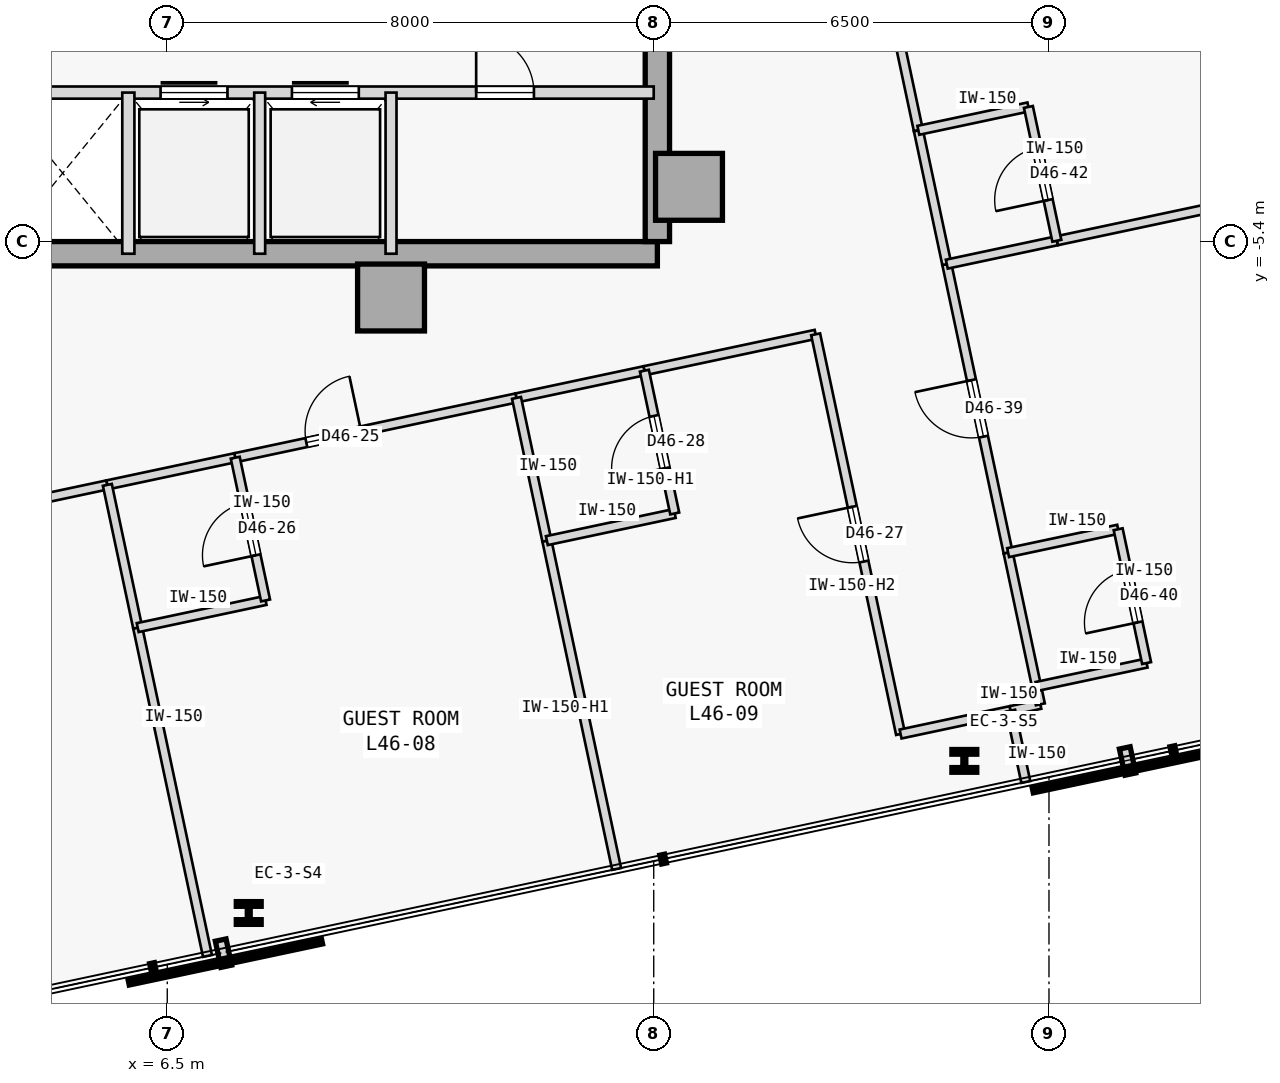
"""IFC4 building model, lengths in metres.
Left out: names, types, materials, properties, quantities, classifications, styles, units other than length and angle.
Written with IfcOpenShell. Run it as: python <this file> out.ifc"""

import sys

from ifc_helpers import new_model, si_unit, direction, frame, frame_2d, origin, origin_2d, place, context, subcontext, project, spatial, rectangle, i_section, extrude, element, fill, save


model = new_model("IFC4")
c1 = context("Model", 3, precision=1e-05, world=origin(), true_north=direction((0.0, 1.0)))
c2 = subcontext(c1, "Body", "Model", "MODEL_VIEW")
j1 = project(units=[si_unit("LENGTHUNIT", "METRE"), si_unit("PLANEANGLEUNIT", "RADIAN")], contexts=[c1])
p1 = place(None, origin())
s1 = spatial("IfcSite", under=j1, at=p1, CompositionType="ELEMENT")
p2 = place(p1, origin())
s2 = spatial("IfcBuilding", under=s1, at=p2, CompositionType="ELEMENT")
p3 = place(p2, frame((0.0, 0.0, 178.6)))
s3 = spatial("IfcBuildingStorey", under=s2, at=p3, CompositionType="ELEMENT", Elevation=178.6)
for number, where, z_axis, x_axis in (
    (1, (15.08, -4.5, 0.0), (0.0, 0.0, 1.0), (1.0, 0.0, 0.0)),
    (2, (10.18, -6.32, 0.0), (0.0, 0.0, 1.0), (1.0, 0.0, 0.0)),
):
    element("IfcColumn", number, at=place(p3, frame(where, z_axis=z_axis, x_axis=x_axis)), inside=s3, PredefinedType="COLUMN", context=c2, shape_type="SweptSolid", body=[
        extrude(rectangle(XDim=1.1, YDim=1.1, at=origin_2d()), origin(), (0.0, 0.0, 1.0), 3.4),
    ])
p4 = place(p3, frame((3.7, -5.6, 0.0), z_axis=(0.0, 0.0, 1.0), x_axis=(1.0, 0.0, 0.0)))
e3 = element("IfcWall", 3, at=p4, inside=s3, PredefinedType="SHEAR", context=c2, shape_type="SweptSolid", body=[
    extrude(rectangle(XDim=10.86, YDim=0.4, at=frame_2d((5.43, 0.0))), origin(), (0.0, 0.0, 1.0), 3.175),
])
p5 = place(p3, frame((14.56, -5.4, 0.0), z_axis=(0.0, 0.0, 1.0), x_axis=(0.0, 1.0, 0.0)))
e4 = element("IfcWall", 4, at=p5, inside=s3, PredefinedType="SHEAR", context=c2, shape_type="SweptSolid", body=[
    extrude(rectangle(XDim=10.8, YDim=0.4, at=frame_2d((5.4, 0.0))), origin(), (0.0, 0.0, 1.0), 3.175),
])
for number, where, z_axis, x_axis in (
    (5, (7.84, -16.441, 0.0), (0.0, 0.0, 1.0), (1.0, 0.0, 0.0)),
    (6, (19.608, -13.94, 0.0), (0.0, 0.0, 1.0), (1.0, 0.0, 0.0)),
):
    element("IfcColumn", number, at=place(p3, frame(where, z_axis=z_axis, x_axis=x_axis)), inside=s3, PredefinedType="COLUMN", context=c2, shape_type="SweptSolid", body=[
        extrude(i_section(OverallWidth=0.409, OverallDepth=0.374, WebThickness=0.048, FlangeThickness=0.077, FilletRadius=0.015, at=origin_2d()), origin(), (0.0, 0.0, 1.0), 3.4),
    ])
p6 = place(p3, frame((3.7, -2.95, 0.0), z_axis=(0.0, 0.0, 1.0), x_axis=(1.0, 0.0, 0.0)))
e7 = element("IfcWall", 7, at=p6, inside=s3, PredefinedType="STANDARD", context=c2, shape_type="SweptSolid", body=[
    extrude(rectangle(XDim=10.8, YDim=0.2, at=frame_2d((5.4, 0.0))), origin(), (0.0, 0.0, 1.0), 3.175),
])
p7 = place(p6, frame((2.69, 0.0, 0.0)))
e8 = element("IfcOpeningElement", 8, at=p7, cuts=e7, PredefinedType="OPENING", context=c2, shape_type="SweptSolid", body=[
    extrude(rectangle(XDim=1.1, YDim=2.15, at=frame_2d((0.55, 1.075))), frame((0.0, 0.11, 0.0), z_axis=(0.0, -1.0, 0.0), x_axis=(1.0, 0.0, 0.0)), (0.0, 0.0, 1.0), 0.22),
])
p8 = place(p6, frame((4.85, 0.0, 0.0)))
e9 = element("IfcOpeningElement", 9, at=p8, cuts=e7, PredefinedType="OPENING", context=c2, shape_type="SweptSolid", body=[
    extrude(rectangle(XDim=1.1, YDim=2.15, at=frame_2d((0.55, 1.075))), frame((0.0, 0.11, 0.0), z_axis=(0.0, -1.0, 0.0), x_axis=(1.0, 0.0, 0.0)), (0.0, 0.0, 1.0), 0.22),
])
p9 = place(p6, frame((7.88, 0.0, 0.0)))
e10 = element("IfcOpeningElement", 10, at=p9, cuts=e7, PredefinedType="OPENING", context=c2, shape_type="SweptSolid", body=[
    extrude(rectangle(XDim=0.95, YDim=2.15, at=frame_2d((0.475, 1.075))), frame((0.0, 0.11, 0.0), z_axis=(0.0, -1.0, 0.0), x_axis=(1.0, 0.0, 0.0)), (0.0, 0.0, 1.0), 0.22),
])
p10 = place(p3, frame((5.86, -5.6, 0.0), z_axis=(0.0, 0.0, 1.0), x_axis=(0.0, 1.0, 0.0)))
e11 = element("IfcWall", 11, at=p10, inside=s3, PredefinedType="STANDARD", context=c2, shape_type="SweptSolid", body=[
    extrude(rectangle(XDim=2.65, YDim=0.2, at=frame_2d((1.325, 0.0))), origin(), (0.0, 0.0, 1.0), 3.175),
])
for number, where, z_axis, x_axis in (
    (12, (10.18, -5.6, 0.0), (0.0, 0.0, 1.0), (0.0, 1.0, 0.0)),
    (13, (8.02, -5.6, 0.0), (0.0, 0.0, 1.0), (0.0, 1.0, 0.0)),
):
    element("IfcWall", number, at=place(p3, frame(where, z_axis=z_axis, x_axis=x_axis)), inside=s3, PredefinedType="STANDARD", context=c2, shape_type="SweptSolid", body=[
        extrude(rectangle(XDim=2.65, YDim=0.18, at=frame_2d((1.325, 0.0))), origin(), (0.0, 0.0, 1.0), 3.175),
    ])
p11 = place(p3, frame((0.889, -10.384, 0.0), z_axis=(0.0, 0.0, 1.0), x_axis=(0.978150846638, 0.207896419455, 0.0)))
e14 = element("IfcWall", 14, at=p11, inside=s3, PredefinedType="PARTITIONING", context=c2, shape_type="SweptSolid", body=[
    extrude(rectangle(XDim=4.729, YDim=0.15, at=frame_2d((2.365, 0.0))), origin(), (0.0, 0.0, 1.0), 3.175),
])
p12 = place(p11, frame((1.905, 0.0, 0.0)))
e15 = element("IfcOpeningElement", 15, at=p12, cuts=e14, PredefinedType="OPENING", context=c2, shape_type="SweptSolid", body=[
    extrude(rectangle(XDim=0.92, YDim=2.15, at=frame_2d((0.46, 1.075))), frame((0.0, 0.085, 0.0), z_axis=(0.0, -1.0, 0.0), x_axis=(1.0, 0.0, 0.0)), (0.0, 0.0, 1.0), 0.17),
])
p13 = place(p3, frame((7.618, -8.954, 0.0), z_axis=(0.0, 0.0, 1.0), x_axis=(0.978140347221, 0.207945812984, 0.0)))
e16 = element("IfcWall", 16, at=p13, inside=s3, PredefinedType="PARTITIONING", context=c2, shape_type="SweptSolid", body=[
    extrude(rectangle(XDim=4.729, YDim=0.15, at=frame_2d((2.365, 0.0))), origin(), (0.0, 0.0, 1.0), 3.175),
])
p14 = place(p13, frame((1.195, 0.0, 0.0)))
e17 = element("IfcOpeningElement", 17, at=p14, cuts=e16, PredefinedType="OPENING", context=c2, shape_type="SweptSolid", body=[
    extrude(rectangle(XDim=0.92, YDim=2.15, at=frame_2d((0.46, 1.075))), frame((0.0, 0.085, 0.0), z_axis=(0.0, -1.0, 0.0), x_axis=(1.0, 0.0, 0.0)), (0.0, 0.0, 1.0), 0.17),
])
p15 = place(p3, frame((5.515, -9.401, 0.0), z_axis=(0.0, 0.0, 1.0), x_axis=(0.978146728319, 0.207915795165, 0.0)))
e18 = element("IfcWall", 18, at=p15, inside=s3, PredefinedType="PARTITIONING", context=c2, shape_type="SweptSolid", body=[
    extrude(rectangle(XDim=2.15, YDim=0.15, at=frame_2d((1.075, 0.0))), origin(), (0.0, 0.0, 1.0), 3.175),
])
p16 = place(p3, frame((14.346, -7.524, 0.0), z_axis=(0.0, 0.0, 1.0), x_axis=(0.97816208355, 0.207843542851, 0.0)))
e19 = element("IfcWall", 19, at=p16, inside=s3, PredefinedType="PARTITIONING", context=c2, shape_type="SweptSolid", body=[
    extrude(rectangle(XDim=2.879, YDim=0.15, at=frame_2d((1.439, 0.0))), origin(), (0.0, 0.0, 1.0), 3.175),
])
p17 = place(p3, frame((18.56, -13.498, 0.0), z_axis=(0.0, 0.0, 1.0), x_axis=(-0.207888737749, 0.978152479278, 0.0)))
e20 = element("IfcWall", 20, at=p17, inside=s3, PredefinedType="PARTITIONING", context=c2, shape_type="SweptSolid", body=[
    extrude(rectangle(XDim=6.72, YDim=0.15, at=frame_2d((3.36, 0.0))), origin(), (0.0, 0.0, 1.0), 2.575),
])
p18 = place(p17, frame((2.9, 0.0, 0.0)))
e21 = element("IfcOpeningElement", 21, at=p18, cuts=e20, PredefinedType="OPENING", context=c2, shape_type="SweptSolid", body=[
    extrude(rectangle(XDim=0.92, YDim=2.15, at=frame_2d((0.46, 1.075))), frame((0.0, 0.085, 0.0), z_axis=(0.0, -1.0, 0.0), x_axis=(1.0, 0.0, 0.0)), (0.0, 0.0, 1.0), 0.17),
])
p19 = place(p3, frame((18.56, -13.498, 0.0), z_axis=(0.0, 0.0, 1.0), x_axis=(0.978160192495, 0.207852442415, 0.0)))
e22 = element("IfcWall", 22, at=p19, inside=s3, PredefinedType="PARTITIONING", context=c2, shape_type="SweptSolid", body=[
    extrude(rectangle(XDim=1.85, YDim=0.15, at=frame_2d((0.925, 0.0))), origin(), (0.0, 0.0, 1.0), 3.175),
])
p20 = place(p3, frame((12.243, -7.971, 0.0), z_axis=(0.0, 0.0, 1.0), x_axis=(0.978146728319, 0.207915795165, 0.0)))
e23 = element("IfcWall", 23, at=p20, inside=s3, PredefinedType="PARTITIONING", context=c2, shape_type="SweptSolid", body=[
    extrude(rectangle(XDim=2.15, YDim=0.15, at=frame_2d((1.075, 0.0))), origin(), (0.0, 0.0, 1.0), 3.175),
])
p21 = place(p3, frame((20.369, -13.114, 0.0), z_axis=(0.0, 0.0, 1.0), x_axis=(0.978143962546, 0.207928806409, 0.0)))
e24 = element("IfcWall", 24, at=p21, inside=s3, PredefinedType="PARTITIONING", context=c2, shape_type="SweptSolid", body=[
    extrude(rectangle(XDim=0.5, YDim=0.15, at=frame_2d((0.25, 0.0))), origin(), (0.0, 0.0, 1.0), 3.175),
])
p22 = place(p3, frame((20.858, -13.01, 0.0), z_axis=(0.0, 0.0, 1.0), x_axis=(-0.208306395052, 0.978063620518, 0.0)))
e25 = element("IfcWall", 25, at=p22, inside=s3, PredefinedType="PARTITIONING", context=c2, shape_type="SweptSolid", body=[
    extrude(rectangle(XDim=0.3, YDim=0.15, at=frame_2d((0.15, 0.0))), origin(), (0.0, 0.0, 1.0), 3.175),
])
p23 = place(p3, frame((20.328, -10.515, 0.0), z_axis=(0.0, 0.0, 1.0), x_axis=(-0.207950868925, 0.97813927235, 0.0)))
e26 = element("IfcWall", 26, at=p23, inside=s3, PredefinedType="PARTITIONING", context=c2, shape_type="SweptSolid", body=[
    extrude(rectangle(XDim=4.85, YDim=0.15, at=frame_2d((2.425, 0.0))), origin(), (0.0, 0.0, 1.0), 3.175),
])
p24 = place(p23, frame((1.95, 0.0, 0.0)))
e27 = element("IfcOpeningElement", 27, at=p24, cuts=e26, PredefinedType="OPENING", context=c2, shape_type="SweptSolid", body=[
    extrude(rectangle(XDim=0.95, YDim=2.15, at=frame_2d((0.475, 1.075))), frame((0.0, 0.085, 0.0), z_axis=(0.0, -1.0, 0.0), x_axis=(1.0, 0.0, 0.0)), (0.0, 0.0, 1.0), 0.17),
])
p25 = place(p3, frame((20.796, -12.716, 0.0), z_axis=(0.0, 0.0, 1.0), x_axis=(-0.207891197838, 0.978151956427, 0.0)))
e28 = element("IfcWall", 28, at=p25, inside=s3, PredefinedType="PARTITIONING", context=c2, shape_type="SweptSolid", body=[
    extrude(rectangle(XDim=2.25, YDim=0.15, at=frame_2d((1.125, 0.0))), origin(), (0.0, 0.0, 1.0), 3.175),
])
p26 = place(p3, frame((18.852, -3.571, 0.0), z_axis=(0.0, 0.0, 1.0), x_axis=(-0.207879907349, 0.978154355979, 0.0)))
e29 = element("IfcWall", 29, at=p26, inside=s3, PredefinedType="PARTITIONING", context=c2, shape_type="SweptSolid", body=[
    extrude(rectangle(XDim=6.35, YDim=0.15, at=frame_2d((3.175, 0.0))), origin(), (0.0, 0.0, 1.0), 3.175),
])
p27 = place(p26, frame((2.7, 0.0, 0.0)))
e30 = element("IfcOpeningElement", 30, at=p27, cuts=e29, PredefinedType="OPENING", context=c2, shape_type="SweptSolid", body=[
    extrude(rectangle(XDim=0.95, YDim=2.15, at=frame_2d((0.475, 1.075))), frame((0.0, 0.085, 0.0), z_axis=(0.0, -1.0, 0.0), x_axis=(1.0, 0.0, 0.0)), (0.0, 0.0, 1.0), 0.17),
])
p28 = place(p3, frame((19.32, -5.771, 0.0), z_axis=(0.0, 0.0, 1.0), x_axis=(-0.207913264065, 0.978147266328, 0.0)))
e31 = element("IfcWall", 31, at=p28, inside=s3, PredefinedType="PARTITIONING", context=c2, shape_type="SweptSolid", body=[
    extrude(rectangle(XDim=2.25, YDim=0.15, at=frame_2d((1.125, 0.0))), origin(), (0.0, 0.0, 1.0), 3.175),
])
p29 = place(p3, frame((7.161, -17.148, 0.0), z_axis=(0.0, 0.0, 1.0), x_axis=(-0.20791588359, 0.978146709523, 0.0)))
e32 = element("IfcWall", 32, at=p29, inside=s3, PredefinedType="PARTITIONING", context=c2, shape_type="SweptSolid", body=[
    extrude(rectangle(XDim=5.52, YDim=0.15, at=frame_2d((2.76, 0.0))), origin(), (0.0, 0.0, 1.0), 3.175),
])
p30 = place(p3, frame((6.014, -11.749, 0.0), z_axis=(0.0, 0.0, 1.0), x_axis=(-0.207937840262, 0.978142042133, 0.0)))
e33 = element("IfcWall", 33, at=p30, inside=s3, PredefinedType="PARTITIONING", context=c2, shape_type="SweptSolid", body=[
    extrude(rectangle(XDim=2.4, YDim=0.15, at=frame_2d((1.2, 0.0))), origin(), (0.0, 0.0, 1.0), 3.175),
])
p31 = place(p3, frame((6.014, -11.749, 0.0), z_axis=(0.0, 0.0, 1.0), x_axis=(0.978146728319, 0.207915795165, 0.0)))
e34 = element("IfcWall", 34, at=p31, inside=s3, PredefinedType="PARTITIONING", context=c2, shape_type="SweptSolid", body=[
    extrude(rectangle(XDim=2.15, YDim=0.15, at=frame_2d((1.075, 0.0))), origin(), (0.0, 0.0, 1.0), 3.175),
])
p32 = place(p3, frame((8.117, -11.302, 0.0), z_axis=(0.0, 0.0, 1.0), x_axis=(-0.207937840262, 0.978142042133, 0.0)))
e35 = element("IfcWall", 35, at=p32, inside=s3, PredefinedType="PARTITIONING", context=c2, shape_type="SweptSolid", body=[
    extrude(rectangle(XDim=2.4, YDim=0.15, at=frame_2d((1.2, 0.0))), origin(), (0.0, 0.0, 1.0), 3.175),
])
p33 = place(p32, frame((0.76, 0.0, 0.0)))
e36 = element("IfcOpeningElement", 36, at=p33, cuts=e35, PredefinedType="OPENING", context=c2, shape_type="SweptSolid", body=[
    extrude(rectangle(XDim=0.88, YDim=2.15, at=frame_2d((0.44, 1.075))), frame((0.0, 0.085, 0.0), z_axis=(0.0, -1.0, 0.0), x_axis=(1.0, 0.0, 0.0)), (0.0, 0.0, 1.0), 0.17),
])
p34 = place(p3, frame((13.89, -15.718, 0.0), z_axis=(0.0, 0.0, 1.0), x_axis=(-0.207873566928, 0.97815570344, 0.0)))
e37 = element("IfcWall", 37, at=p34, inside=s3, PredefinedType="PARTITIONING", context=c2, shape_type="SweptSolid", body=[
    extrude(rectangle(XDim=5.52, YDim=0.15, at=frame_2d((2.76, 0.0))), origin(), (0.0, 0.0, 1.0), 2.725),
])
p35 = place(p3, frame((12.742, -10.318, 0.0), z_axis=(0.0, 0.0, 1.0), x_axis=(-0.207917150959, 0.978146440129, 0.0)))
e38 = element("IfcWall", 38, at=p35, inside=s3, PredefinedType="PARTITIONING", context=c2, shape_type="SweptSolid", body=[
    extrude(rectangle(XDim=2.4, YDim=0.15, at=frame_2d((1.2, 0.0))), origin(), (0.0, 0.0, 1.0), 3.175),
])
p36 = place(p3, frame((12.742, -10.318, 0.0), z_axis=(0.0, 0.0, 1.0), x_axis=(0.978146728319, 0.207915795165, 0.0)))
e39 = element("IfcWall", 39, at=p36, inside=s3, PredefinedType="PARTITIONING", context=c2, shape_type="SweptSolid", body=[
    extrude(rectangle(XDim=2.15, YDim=0.15, at=frame_2d((1.075, 0.0))), origin(), (0.0, 0.0, 1.0), 3.175),
])
p37 = place(p3, frame((14.845, -9.871, 0.0), z_axis=(0.0, 0.0, 1.0), x_axis=(-0.207917150959, 0.978146440129, 0.0)))
e40 = element("IfcWall", 40, at=p37, inside=s3, PredefinedType="PARTITIONING", context=c2, shape_type="SweptSolid", body=[
    extrude(rectangle(XDim=2.4, YDim=0.15, at=frame_2d((1.2, 0.0))), origin(), (0.0, 0.0, 1.0), 2.725),
])
p38 = place(p37, frame((0.76, 0.0, 0.0)))
e41 = element("IfcOpeningElement", 41, at=p38, cuts=e40, PredefinedType="OPENING", context=c2, shape_type="SweptSolid", body=[
    extrude(rectangle(XDim=0.88, YDim=2.15, at=frame_2d((0.44, 1.075))), frame((0.0, 0.085, 0.0), z_axis=(0.0, -1.0, 0.0), x_axis=(1.0, 0.0, 0.0)), (0.0, 0.0, 1.0), 0.17),
])
p39 = place(p3, frame((20.619, -14.288, 0.0), z_axis=(0.0, 0.0, 1.0), x_axis=(-0.207917150959, 0.978146440129, 0.0)))
e42 = element("IfcWall", 42, at=p39, inside=s3, PredefinedType="PARTITIONING", context=c2, shape_type="SweptSolid", body=[
    extrude(rectangle(XDim=1.2, YDim=0.15, at=frame_2d((0.6, 0.0))), origin(), (0.0, 0.0, 1.0), 3.175),
])
for number, where, z_axis, x_axis in (
    (43, (20.796, -12.716, 0.0), (0.0, 0.0, 1.0), (0.978, 0.208, 0.0)),
    (44, (20.328, -10.515, 0.0), (0.0, 0.0, 1.0), (0.978, 0.208, 0.0)),
):
    element("IfcWall", number, at=place(p3, frame(where, z_axis=z_axis, x_axis=x_axis)), inside=s3, PredefinedType="PARTITIONING", context=c2, shape_type="SweptSolid", body=[
        extrude(rectangle(XDim=1.85, YDim=0.15, at=frame_2d((0.925, 0.0))), origin(), (0.0, 0.0, 1.0), 3.175),
    ])
p40 = place(p3, frame((22.605, -12.332, 0.0), z_axis=(0.0, 0.0, 1.0), x_axis=(-0.207891197838, 0.978151956427, 0.0)))
e45 = element("IfcWall", 45, at=p40, inside=s3, PredefinedType="PARTITIONING", context=c2, shape_type="SweptSolid", body=[
    extrude(rectangle(XDim=2.25, YDim=0.15, at=frame_2d((1.125, 0.0))), origin(), (0.0, 0.0, 1.0), 3.175),
])
p41 = place(p40, frame((0.685, 0.0, 0.0)))
e46 = element("IfcOpeningElement", 46, at=p41, cuts=e45, PredefinedType="OPENING", context=c2, shape_type="SweptSolid", body=[
    extrude(rectangle(XDim=0.88, YDim=2.15, at=frame_2d((0.44, 1.075))), frame((0.0, 0.085, 0.0), z_axis=(0.0, -1.0, 0.0), x_axis=(1.0, 0.0, 0.0)), (0.0, 0.0, 1.0), 0.17),
])
p42 = place(p3, frame((21.129, -5.387, 0.0), z_axis=(0.0, 0.0, 1.0), x_axis=(0.97814556055, 0.207921288896, 0.0)))
e47 = element("IfcWall", 47, at=p42, inside=s3, PredefinedType="PARTITIONING", context=c2, shape_type="SweptSolid", body=[
    extrude(rectangle(XDim=12.187, YDim=0.15, at=frame_2d((6.094, 0.0))), origin(), (0.0, 0.0, 1.0), 2.725),
])
p43 = place(p3, frame((19.32, -5.771, 0.0), z_axis=(0.0, 0.0, 1.0), x_axis=(0.978165892835, 0.207825614625, 0.0)))
e48 = element("IfcWall", 48, at=p43, inside=s3, PredefinedType="PARTITIONING", context=c2, shape_type="SweptSolid", body=[
    extrude(rectangle(XDim=1.85, YDim=0.15, at=frame_2d((0.925, 0.0))), origin(), (0.0, 0.0, 1.0), 3.175),
])
p44 = place(p3, frame((18.852, -3.571, 0.0), z_axis=(0.0, 0.0, 1.0), x_axis=(0.978139061018, 0.207951862966, 0.0)))
e49 = element("IfcWall", 49, at=p44, inside=s3, PredefinedType="PARTITIONING", context=c2, shape_type="SweptSolid", body=[
    extrude(rectangle(XDim=1.85, YDim=0.15, at=frame_2d((0.925, 0.0))), origin(), (0.0, 0.0, 1.0), 3.175),
])
p45 = place(p3, frame((21.129, -5.387, 0.0), z_axis=(0.0, 0.0, 1.0), x_axis=(-0.207891197838, 0.978151956427, 0.0)))
e50 = element("IfcWall", 50, at=p45, inside=s3, PredefinedType="PARTITIONING", context=c2, shape_type="SweptSolid", body=[
    extrude(rectangle(XDim=2.25, YDim=0.15, at=frame_2d((1.125, 0.0))), origin(), (0.0, 0.0, 1.0), 3.175),
])
p46 = place(p45, frame((0.685, 0.0, 0.0)))
e51 = element("IfcOpeningElement", 51, at=p46, cuts=e50, PredefinedType="OPENING", context=c2, shape_type="SweptSolid", body=[
    extrude(rectangle(XDim=0.88, YDim=2.15, at=frame_2d((0.44, 1.075))), frame((0.0, 0.085, 0.0), z_axis=(0.0, -1.0, 0.0), x_axis=(1.0, 0.0, 0.0)), (0.0, 0.0, 1.0), 0.17),
])
p47 = place(p7, origin())
e52 = element("IfcDoor", 52, at=p47, inside=s3, OperationType="SLIDING_TO_LEFT", PredefinedType="DOOR", context=c2, shape_type="SweptSolid", body=[
    extrude(rectangle(XDim=1.1, YDim=2.15, at=frame_2d((0.55, 1.075))), frame((0.0, 0.025, 0.0), z_axis=(0.0, -1.0, 0.0), x_axis=(1.0, 0.0, 0.0)), (0.0, 0.0, 1.0), 0.05),
])
fill(e8, e52)
p48 = place(p8, origin())
e53 = element("IfcDoor", 53, at=p48, inside=s3, OperationType="SLIDING_TO_RIGHT", PredefinedType="DOOR", context=c2, shape_type="SweptSolid", body=[
    extrude(rectangle(XDim=1.1, YDim=2.15, at=frame_2d((0.55, 1.075))), frame((0.0, 0.025, 0.0), z_axis=(0.0, -1.0, 0.0), x_axis=(1.0, 0.0, 0.0)), (0.0, 0.0, 1.0), 0.05),
])
fill(e9, e53)
p49 = place(p9, origin())
e54 = element("IfcDoor", 54, at=p49, inside=s3, OperationType="SINGLE_SWING_LEFT", PredefinedType="DOOR", context=c2, shape_type="SweptSolid", body=[
    extrude(rectangle(XDim=0.95, YDim=2.15, at=frame_2d((0.475, 1.075))), frame((0.0, 0.025, 0.0), z_axis=(0.0, -1.0, 0.0), x_axis=(1.0, 0.0, 0.0)), (0.0, 0.0, 1.0), 0.05),
])
fill(e10, e54)
p50 = place(p14, origin())
e55 = element("IfcDoor", 55, at=p50, inside=s3, OperationType="SINGLE_SWING_RIGHT", PredefinedType="DOOR", context=c2, shape_type="SweptSolid", body=[
    extrude(rectangle(XDim=0.92, YDim=2.15, at=frame_2d((0.46, 1.075))), frame((0.0, 0.025, 0.0), z_axis=(0.0, -1.0, 0.0), x_axis=(1.0, 0.0, 0.0)), (0.0, 0.0, 1.0), 0.05),
])
fill(e17, e55)
p51 = place(p33, origin())
e56 = element("IfcDoor", 56, at=p51, inside=s3, OperationType="SINGLE_SWING_LEFT", PredefinedType="DOOR", context=c2, shape_type="SweptSolid", body=[
    extrude(rectangle(XDim=0.88, YDim=2.15, at=frame_2d((0.44, 1.075))), frame((0.0, 0.025, 0.0), z_axis=(0.0, -1.0, 0.0), x_axis=(1.0, 0.0, 0.0)), (0.0, 0.0, 1.0), 0.05),
])
fill(e36, e56)
p52 = place(p18, origin())
e57 = element("IfcDoor", 57, at=p52, inside=s3, OperationType="SINGLE_SWING_RIGHT", PredefinedType="DOOR", context=c2, shape_type="SweptSolid", body=[
    extrude(rectangle(XDim=0.92, YDim=2.15, at=frame_2d((0.46, 1.075))), frame((0.0, 0.025, 0.0), z_axis=(0.0, -1.0, 0.0), x_axis=(1.0, 0.0, 0.0)), (0.0, 0.0, 1.0), 0.05),
])
fill(e21, e57)
p53 = place(p38, origin())
e58 = element("IfcDoor", 58, at=p53, inside=s3, OperationType="SINGLE_SWING_LEFT", PredefinedType="DOOR", context=c2, shape_type="SweptSolid", body=[
    extrude(rectangle(XDim=0.88, YDim=2.15, at=frame_2d((0.44, 1.075))), frame((0.0, 0.025, 0.0), z_axis=(0.0, -1.0, 0.0), x_axis=(1.0, 0.0, 0.0)), (0.0, 0.0, 1.0), 0.05),
])
fill(e41, e58)
p54 = place(p24, origin())
e59 = element("IfcDoor", 59, at=p54, inside=s3, OperationType="SINGLE_SWING_RIGHT", PredefinedType="DOOR", context=c2, shape_type="SweptSolid", body=[
    extrude(rectangle(XDim=0.95, YDim=2.15, at=frame_2d((0.475, 1.075))), frame((0.0, 0.025, 0.0), z_axis=(0.0, -1.0, 0.0), x_axis=(1.0, 0.0, 0.0)), (0.0, 0.0, 1.0), 0.05),
])
fill(e27, e59)
p55 = place(p41, origin())
e60 = element("IfcDoor", 60, at=p55, inside=s3, OperationType="SINGLE_SWING_LEFT", PredefinedType="DOOR", context=c2, shape_type="SweptSolid", body=[
    extrude(rectangle(XDim=0.88, YDim=2.15, at=frame_2d((0.44, 1.075))), frame((0.0, 0.025, 0.0), z_axis=(0.0, -1.0, 0.0), x_axis=(1.0, 0.0, 0.0)), (0.0, 0.0, 1.0), 0.05),
])
fill(e46, e60)
p56 = place(p46, origin())
e61 = element("IfcDoor", 61, at=p56, inside=s3, OperationType="SINGLE_SWING_LEFT", PredefinedType="DOOR", context=c2, shape_type="SweptSolid", body=[
    extrude(rectangle(XDim=0.88, YDim=2.15, at=frame_2d((0.44, 1.075))), frame((0.0, 0.025, 0.0), z_axis=(0.0, -1.0, 0.0), x_axis=(1.0, 0.0, 0.0)), (0.0, 0.0, 1.0), 0.05),
])
fill(e51, e61)
save(model, sys.argv[1])
